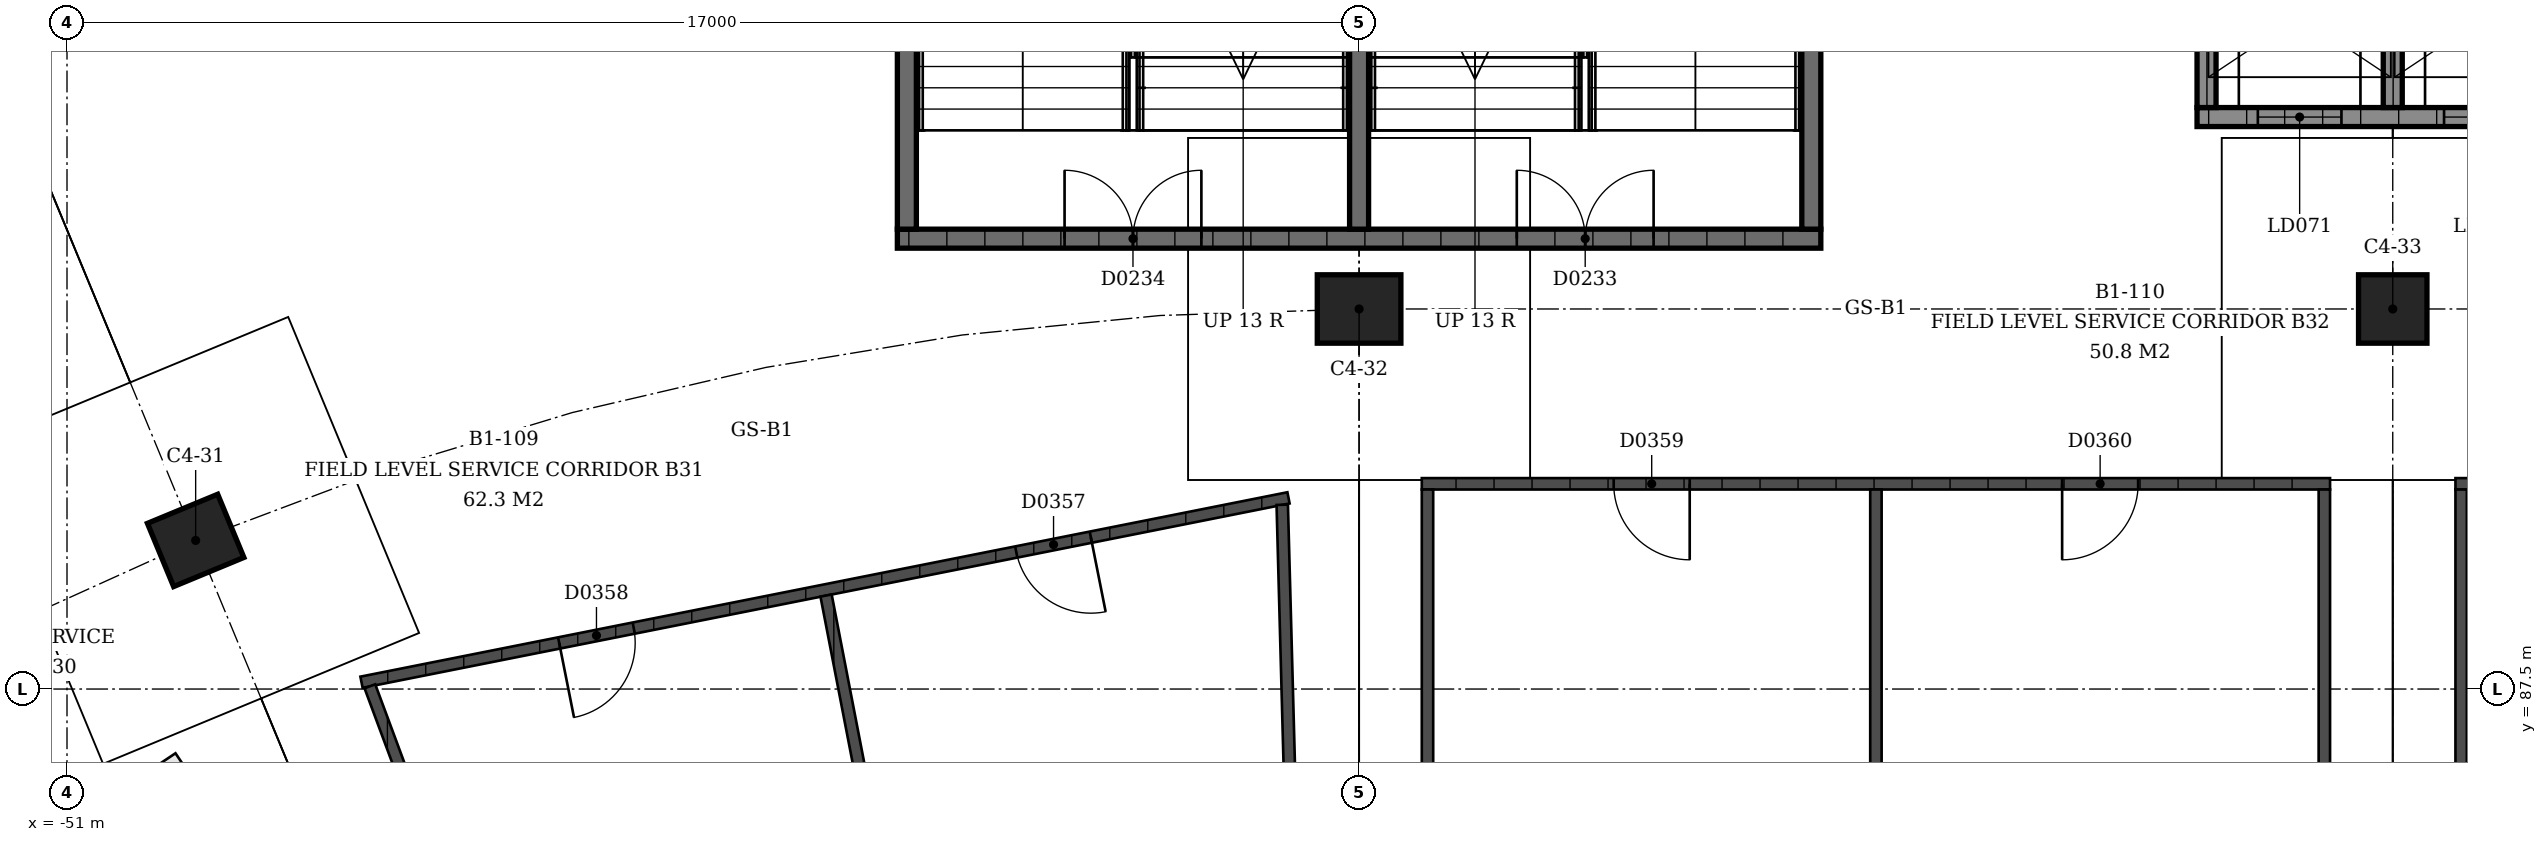
"""IFC4 building model, lengths in metres.
Left out: names, types, materials, properties, quantities, classifications, styles, units other than length and angle.
Written with IfcOpenShell. Run it as: python <this file> out.ifc"""

import sys

from ifc_helpers import new_model, si_unit, direction, frame, frame_2d, origin, origin_2d, place, context, subcontext, project, spatial, rectangle, extrude, element, fill, save


model = new_model("IFC4")
c1 = context("Model", 3, precision=1e-05, world=origin(), true_north=direction((0.0, 1.0)))
c2 = subcontext(c1, "Body", "Model", "MODEL_VIEW")
j1 = project(units=[si_unit("LENGTHUNIT", "METRE"), si_unit("PLANEANGLEUNIT", "RADIAN")], contexts=[c1])
p1 = place(None, origin())
s1 = spatial("IfcSite", under=j1, at=p1, CompositionType="ELEMENT")
p2 = place(p1, origin())
s2 = spatial("IfcBuilding", under=s1, at=p2, CompositionType="ELEMENT")
p3 = place(p2, frame((0.0, 0.0, -4.5)))
s3 = spatial("IfcBuildingStorey", under=s2, at=p3, CompositionType="ELEMENT", Elevation=-4.5)
p4 = place(p3, frame((-49.307, 89.455, 0.0), z_axis=(0.0, 0.0, 1.0), x_axis=(-0.923879532511, -0.382683432365, 0.0)))
e1 = element("IfcColumn", 1, at=p4, inside=s3, PredefinedType="COLUMN", context=c2, shape_type="SweptSolid", body=[
    extrude(rectangle(XDim=1.0, YDim=0.9, at=origin_2d()), origin(), (0.0, 0.0, 1.0), 4.5),
])
p5 = place(p3, frame((-34.0, 92.5, 0.0), z_axis=(0.0, 0.0, 1.0), x_axis=(-1.0, 0.0, 0.0)))
e2 = element("IfcColumn", 2, at=p5, inside=s3, PredefinedType="COLUMN", context=c2, shape_type="SweptSolid", body=[
    extrude(rectangle(XDim=1.1, YDim=0.9, at=origin_2d()), origin(), (0.0, 0.0, 1.0), 4.5),
])
p6 = place(p3, frame((-20.4, 92.5, 0.0), z_axis=(0.0, 0.0, 1.0), x_axis=(-1.0, 0.0, 0.0)))
e3 = element("IfcColumn", 3, at=p6, inside=s3, PredefinedType="COLUMN", context=c2, shape_type="SweptSolid", body=[
    extrude(rectangle(XDim=0.9, YDim=0.9, at=origin_2d()), origin(), (0.0, 0.0, 1.0), 4.5),
])
p7 = place(p3, frame((-27.925, 93.425, 0.0), z_axis=(0.0, 0.0, 1.0), x_axis=(-1.0, 0.0, 0.0)))
e4 = element("IfcWall", 4, at=p7, inside=s3, PredefinedType="SHEAR", context=c2, shape_type="SweptSolid", body=[
    extrude(rectangle(XDim=12.15, YDim=0.25, at=frame_2d((6.075, 0.0))), origin(), (0.0, 0.0, 1.0), 4.09),
])
p8 = place(p7, frame((2.2, 0.0, 0.0)))
e5 = element("IfcOpeningElement", 5, at=p8, cuts=e4, PredefinedType="OPENING", context=c2, shape_type="SweptSolid", body=[
    extrude(rectangle(XDim=1.8, YDim=2.1, at=frame_2d((0.9, 1.05))), frame((0.0, 0.125, 0.0), z_axis=(0.0, -1.0, 0.0), x_axis=(1.0, 0.0, 0.0)), (0.0, 0.0, 1.0), 0.25),
])
p9 = place(p7, frame((8.15, 0.0, 0.0)))
e6 = element("IfcOpeningElement", 6, at=p9, cuts=e4, PredefinedType="OPENING", context=c2, shape_type="SweptSolid", body=[
    extrude(rectangle(XDim=1.8, YDim=2.1, at=frame_2d((0.9, 1.05))), frame((0.0, 0.125, 0.0), z_axis=(0.0, -1.0, 0.0), x_axis=(1.0, 0.0, 0.0)), (0.0, 0.0, 1.0), 0.25),
])
p10 = place(p3, frame((-28.05, 93.55, 0.0), z_axis=(0.0, 0.0, 1.0), x_axis=(0.0, 1.0, 0.0)))
e7 = element("IfcWall", 7, at=p10, inside=s3, PredefinedType="SHEAR", context=c2, shape_type="SweptSolid", body=[
    extrude(rectangle(XDim=7.46, YDim=0.25, at=frame_2d((3.73, 0.0))), origin(), (0.0, 0.0, 1.0), 4.09),
])
p11 = place(p3, frame((-39.95, 93.55, 0.0), z_axis=(0.0, 0.0, 1.0), x_axis=(0.0, 1.0, 0.0)))
e8 = element("IfcWall", 8, at=p11, inside=s3, PredefinedType="SHEAR", context=c2, shape_type="SweptSolid", body=[
    extrude(rectangle(XDim=7.71, YDim=0.25, at=frame_2d((3.855, 0.0))), origin(), (0.0, 0.0, 1.0), 4.09),
])
p12 = place(p3, frame((-34.0, 93.55, 0.0), z_axis=(0.0, 0.0, 1.0), x_axis=(0.0, 1.0, 0.0)))
e9 = element("IfcWall", 9, at=p12, inside=s3, PredefinedType="SHEAR", context=c2, shape_type="SweptSolid", body=[
    extrude(rectangle(XDim=7.46, YDim=0.25, at=frame_2d((3.73, 0.0))), origin(), (0.0, 0.0, 1.0), 4.09),
])
p13 = place(p3, frame((-17.825, 95.025, -1.2), z_axis=(0.0, 0.0, 1.0), x_axis=(-1.0, 0.0, 0.0)))
e10 = element("IfcWall", 10, at=p13, inside=s3, PredefinedType="SHEAR", context=c2, shape_type="SweptSolid", body=[
    extrude(rectangle(XDim=5.15, YDim=0.25, at=frame_2d((2.575, 0.0))), origin(), (0.0, 0.0, 1.0), 5.29),
])
p14 = place(p13, frame((0.8, 0.0, 1.2)))
e11 = element("IfcOpeningElement", 11, at=p14, cuts=e10, PredefinedType="OPENING", context=c2, shape_type="SweptSolid", body=[
    extrude(rectangle(XDim=1.1, YDim=2.1, at=frame_2d((0.55, 1.05))), frame((0.0, 0.125, 0.0), z_axis=(0.0, -1.0, 0.0), x_axis=(1.0, 0.0, 0.0)), (0.0, 0.0, 1.0), 0.25),
])
p15 = place(p13, frame((3.25, 0.0, 1.2)))
e12 = element("IfcOpeningElement", 12, at=p15, cuts=e10, PredefinedType="OPENING", context=c2, shape_type="SweptSolid", body=[
    extrude(rectangle(XDim=1.1, YDim=2.1, at=frame_2d((0.55, 1.05))), frame((0.0, 0.125, 0.0), z_axis=(0.0, -1.0, 0.0), x_axis=(1.0, 0.0, 0.0)), (0.0, 0.0, 1.0), 0.25),
])
for number, where, z_axis, x_axis in (
    (13, (-22.85, 95.15, -1.2), (0.0, 0.0, 1.0), (0.0, 1.0, 0.0)),
    (14, (-20.4, 95.15, -1.2), (0.0, 0.0, 1.0), (0.0, 1.0, 0.0)),
):
    element("IfcWall", number, at=place(p3, frame(where, z_axis=z_axis, x_axis=x_axis)), inside=s3, PredefinedType="SHEAR", context=c2, shape_type="SweptSolid", body=[
        extrude(rectangle(XDim=3.0, YDim=0.25, at=frame_2d((1.5, 0.0))), origin(), (0.0, 0.0, 1.0), 5.29),
    ])
p16 = place(p3, frame((-59.871, 79.684, 0.0), z_axis=(0.0, 0.0, 1.0), x_axis=(0.831466906785, 0.555574282091, 0.0)))
e15 = element("IfcWall", 15, at=p16, inside=s3, PredefinedType="PARTITIONING", context=c2, shape_type="SweptSolid", body=[
    extrude(rectangle(XDim=12.436, YDim=0.15, at=frame_2d((6.218, 0.0))), origin(), (0.0, 0.0, 1.0), 3.0),
])
p17 = place(p16, frame((2.652, 0.0, 0.0)))
e16 = element("IfcOpeningElement", 16, at=p17, cuts=e15, PredefinedType="OPENING", context=c2, shape_type="SweptSolid", body=[
    extrude(rectangle(XDim=1.0, YDim=2.1, at=frame_2d((0.5, 1.05))), frame((0.0, 0.075, 0.0), z_axis=(0.0, -1.0, 0.0), x_axis=(1.0, 0.0, 0.0)), (0.0, 0.0, 1.0), 0.15),
])
p18 = place(p16, frame((8.784, 0.0, 0.0)))
e17 = element("IfcOpeningElement", 17, at=p18, cuts=e15, PredefinedType="OPENING", context=c2, shape_type="SweptSolid", body=[
    extrude(rectangle(XDim=1.0, YDim=2.1, at=frame_2d((0.5, 1.05))), frame((0.0, 0.075, 0.0), z_axis=(0.0, -1.0, 0.0), x_axis=(1.0, 0.0, 0.0)), (0.0, 0.0, 1.0), 0.15),
])
p19 = place(p3, frame((-34.929, 90.015, 0.0), z_axis=(0.0, 0.0, 1.0), x_axis=(-0.980781768414, -0.19510797715, 0.0)))
e18 = element("IfcWall", 18, at=p19, inside=s3, PredefinedType="SOLIDWALL", context=c2, shape_type="SweptSolid", body=[
    extrude(rectangle(XDim=12.436, YDim=0.15, at=frame_2d((6.218, 0.0))), origin(), (0.0, 0.0, 1.0), 3.0),
])
p20 = place(p19, frame((2.652, 0.0, 0.0)))
e19 = element("IfcOpeningElement", 19, at=p20, cuts=e18, PredefinedType="OPENING", context=c2, shape_type="SweptSolid", body=[
    extrude(rectangle(XDim=1.0, YDim=2.1, at=frame_2d((0.5, 1.05))), frame((0.0, 0.075, 0.0), z_axis=(0.0, -1.0, 0.0), x_axis=(1.0, 0.0, 0.0)), (0.0, 0.0, 1.0), 0.15),
])
p21 = place(p19, frame((8.784, 0.0, 0.0)))
e20 = element("IfcOpeningElement", 20, at=p21, cuts=e18, PredefinedType="OPENING", context=c2, shape_type="SweptSolid", body=[
    extrude(rectangle(XDim=1.0, YDim=2.1, at=frame_2d((0.5, 1.05))), frame((0.0, 0.075, 0.0), z_axis=(0.0, -1.0, 0.0), x_axis=(1.0, 0.0, 0.0)), (0.0, 0.0, 1.0), 0.15),
])
p22 = place(p3, frame((-34.754, 80.425, 0.0), z_axis=(0.0, 0.0, 1.0), x_axis=(-0.027003283405, 0.999635344856, 0.0)))
e21 = element("IfcWall", 21, at=p22, inside=s3, PredefinedType="SOLIDWALL", context=c2, shape_type="SweptSolid", body=[
    extrude(rectangle(XDim=9.502, YDim=0.15, at=frame_2d((4.751, 0.0))), origin(), (0.0, 0.0, 1.0), 3.0),
])
p23 = place(p3, frame((-39.233, 79.534, 0.0), z_axis=(0.0, 0.0, 1.0), x_axis=(-0.190042167924, 0.98177592882, 0.0)))
e22 = element("IfcWall", 22, at=p23, inside=s3, PredefinedType="SOLIDWALL", context=c2, shape_type="SweptSolid", body=[
    extrude(rectangle(XDim=9.366, YDim=0.15, at=frame_2d((4.683, 0.0))), origin(), (0.0, 0.0, 1.0), 3.0),
])
p24 = place(p3, frame((-43.711, 78.643, 0.0), z_axis=(0.0, 0.0, 1.0), x_axis=(-0.348225298515, 0.937410871216, 0.0)))
e23 = element("IfcWall", 23, at=p24, inside=s3, PredefinedType="SOLIDWALL", context=c2, shape_type="SweptSolid", body=[
    extrude(rectangle(XDim=9.487, YDim=0.15, at=frame_2d((4.743, 0.0))), origin(), (0.0, 0.0, 1.0), 3.0),
])
p25 = place(p3, frame((-33.175, 90.2, 0.0), z_axis=(0.0, 0.0, 1.0), x_axis=(1.0, 0.0, 0.0)))
e24 = element("IfcWall", 24, at=p25, inside=s3, PredefinedType="SOLIDWALL", context=c2, shape_type="SweptSolid", body=[
    extrude(rectangle(XDim=11.95, YDim=0.15, at=frame_2d((5.975, 0.0))), origin(), (0.0, 0.0, 1.0), 3.0),
])
p26 = place(p25, frame((2.525, 0.0, 0.0)))
e25 = element("IfcOpeningElement", 25, at=p26, cuts=e24, PredefinedType="OPENING", context=c2, shape_type="SweptSolid", body=[
    extrude(rectangle(XDim=1.0, YDim=2.1, at=frame_2d((0.5, 1.05))), frame((0.0, 0.075, 0.0), z_axis=(0.0, -1.0, 0.0), x_axis=(1.0, 0.0, 0.0)), (0.0, 0.0, 1.0), 0.15),
])
p27 = place(p25, frame((8.425, 0.0, 0.0)))
e26 = element("IfcOpeningElement", 26, at=p27, cuts=e24, PredefinedType="OPENING", context=c2, shape_type="SweptSolid", body=[
    extrude(rectangle(XDim=1.0, YDim=2.1, at=frame_2d((0.5, 1.05))), frame((0.0, 0.075, 0.0), z_axis=(0.0, -1.0, 0.0), x_axis=(1.0, 0.0, 0.0)), (0.0, 0.0, 1.0), 0.15),
])
for number, where, z_axis, x_axis in (
    (27, (-33.1, 80.575, 0.0), (0.0, 0.0, 1.0), (0.0, 1.0, 0.0)),
    (28, (-27.2, 80.575, 0.0), (0.0, 0.0, 1.0), (0.0, 1.0, 0.0)),
    (29, (-21.3, 80.575, 0.0), (0.0, 0.0, 1.0), (0.0, 1.0, 0.0)),
):
    element("IfcWall", number, at=place(p3, frame(where, z_axis=z_axis, x_axis=x_axis)), inside=s3, PredefinedType="SOLIDWALL", context=c2, shape_type="SweptSolid", body=[
        extrude(rectangle(XDim=9.55, YDim=0.15, at=frame_2d((4.775, 0.0))), origin(), (0.0, 0.0, 1.0), 3.0),
    ])
p28 = place(p3, frame((-7.625, 90.2, 0.0), z_axis=(0.0, 0.0, 1.0), x_axis=(-1.0, 0.0, 0.0)))
e30 = element("IfcWall", 30, at=p28, inside=s3, PredefinedType="SOLIDWALL", context=c2, shape_type="SweptSolid", body=[
    extrude(rectangle(XDim=11.95, YDim=0.15, at=frame_2d((5.975, 0.0))), origin(), (0.0, 0.0, 1.0), 3.0),
])
p29 = place(p28, frame((2.525, 0.0, 0.0)))
e31 = element("IfcOpeningElement", 31, at=p29, cuts=e30, PredefinedType="OPENING", context=c2, shape_type="SweptSolid", body=[
    extrude(rectangle(XDim=1.0, YDim=2.1, at=frame_2d((0.5, 1.05))), frame((0.0, 0.075, 0.0), z_axis=(0.0, -1.0, 0.0), x_axis=(1.0, 0.0, 0.0)), (0.0, 0.0, 1.0), 0.15),
])
p30 = place(p28, frame((8.425, 0.0, 0.0)))
e32 = element("IfcOpeningElement", 32, at=p30, cuts=e30, PredefinedType="OPENING", context=c2, shape_type="SweptSolid", body=[
    extrude(rectangle(XDim=1.0, YDim=2.1, at=frame_2d((0.5, 1.05))), frame((0.0, 0.075, 0.0), z_axis=(0.0, -1.0, 0.0), x_axis=(1.0, 0.0, 0.0)), (0.0, 0.0, 1.0), 0.15),
])
p31 = place(p3, frame((-19.5, 80.575, 0.0), z_axis=(0.0, 0.0, 1.0), x_axis=(0.0, 1.0, 0.0)))
e33 = element("IfcWall", 33, at=p31, inside=s3, PredefinedType="SOLIDWALL", context=c2, shape_type="SweptSolid", body=[
    extrude(rectangle(XDim=9.55, YDim=0.15, at=frame_2d((4.775, 0.0))), origin(), (0.0, 0.0, 1.0), 3.0),
])
p32 = place(p8, origin())
e34 = element("IfcDoor", 34, at=p32, inside=s3, OperationType="DOUBLE_DOOR_SINGLE_SWING", PredefinedType="DOOR", context=c2, shape_type="SweptSolid", body=[
    extrude(rectangle(XDim=1.8, YDim=2.1, at=frame_2d((0.9, 1.05))), frame((0.0, 0.025, 0.0), z_axis=(0.0, -1.0, 0.0), x_axis=(1.0, 0.0, 0.0)), (0.0, 0.0, 1.0), 0.05),
])
fill(e5, e34)
p33 = place(p9, origin())
e35 = element("IfcDoor", 35, at=p33, inside=s3, OperationType="DOUBLE_DOOR_SINGLE_SWING", PredefinedType="DOOR", context=c2, shape_type="SweptSolid", body=[
    extrude(rectangle(XDim=1.8, YDim=2.1, at=frame_2d((0.9, 1.05))), frame((0.0, 0.025, 0.0), z_axis=(0.0, -1.0, 0.0), x_axis=(1.0, 0.0, 0.0)), (0.0, 0.0, 1.0), 0.05),
])
fill(e6, e35)
p34 = place(p14, origin())
e36 = element("IfcDoor", 36, at=p34, inside=s3, OperationType="SLIDING_TO_LEFT", PredefinedType="DOOR", context=c2, shape_type="SweptSolid", body=[
    extrude(rectangle(XDim=1.1, YDim=2.1, at=frame_2d((0.55, 1.05))), frame((0.0, 0.025, 0.0), z_axis=(0.0, -1.0, 0.0), x_axis=(1.0, 0.0, 0.0)), (0.0, 0.0, 1.0), 0.05),
])
fill(e11, e36)
p35 = place(p15, origin())
e37 = element("IfcDoor", 37, at=p35, inside=s3, OperationType="SLIDING_TO_LEFT", PredefinedType="DOOR", context=c2, shape_type="SweptSolid", body=[
    extrude(rectangle(XDim=1.1, YDim=2.1, at=frame_2d((0.55, 1.05))), frame((0.0, 0.025, 0.0), z_axis=(0.0, -1.0, 0.0), x_axis=(1.0, 0.0, 0.0)), (0.0, 0.0, 1.0), 0.05),
])
fill(e12, e37)
p36 = place(p20, origin())
e38 = element("IfcDoor", 38, at=p36, inside=s3, OperationType="SINGLE_SWING_RIGHT", PredefinedType="DOOR", context=c2, shape_type="SweptSolid", body=[
    extrude(rectangle(XDim=1.0, YDim=2.1, at=frame_2d((0.5, 1.05))), frame((0.0, 0.025, 0.0), z_axis=(0.0, -1.0, 0.0), x_axis=(1.0, 0.0, 0.0)), (0.0, 0.0, 1.0), 0.05),
])
fill(e19, e38)
p37 = place(p21, origin())
e39 = element("IfcDoor", 39, at=p37, inside=s3, OperationType="SINGLE_SWING_LEFT", PredefinedType="DOOR", context=c2, shape_type="SweptSolid", body=[
    extrude(rectangle(XDim=1.0, YDim=2.1, at=frame_2d((0.5, 1.05))), frame((0.0, 0.025, 0.0), z_axis=(0.0, -1.0, 0.0), x_axis=(1.0, 0.0, 0.0)), (0.0, 0.0, 1.0), 0.05),
])
fill(e20, e39)
p38 = place(p26, origin())
e40 = element("IfcDoor", 40, at=p38, inside=s3, OperationType="SINGLE_SWING_RIGHT", PredefinedType="DOOR", context=c2, shape_type="SweptSolid", body=[
    extrude(rectangle(XDim=1.0, YDim=2.1, at=frame_2d((0.5, 1.05))), frame((0.0, 0.025, 0.0), z_axis=(0.0, -1.0, 0.0), x_axis=(1.0, 0.0, 0.0)), (0.0, 0.0, 1.0), 0.05),
])
fill(e25, e40)
p39 = place(p27, origin())
e41 = element("IfcDoor", 41, at=p39, inside=s3, OperationType="SINGLE_SWING_LEFT", PredefinedType="DOOR", context=c2, shape_type="SweptSolid", body=[
    extrude(rectangle(XDim=1.0, YDim=2.1, at=frame_2d((0.5, 1.05))), frame((0.0, 0.025, 0.0), z_axis=(0.0, -1.0, 0.0), x_axis=(1.0, 0.0, 0.0)), (0.0, 0.0, 1.0), 0.05),
])
fill(e26, e41)
save(model, sys.argv[1])
